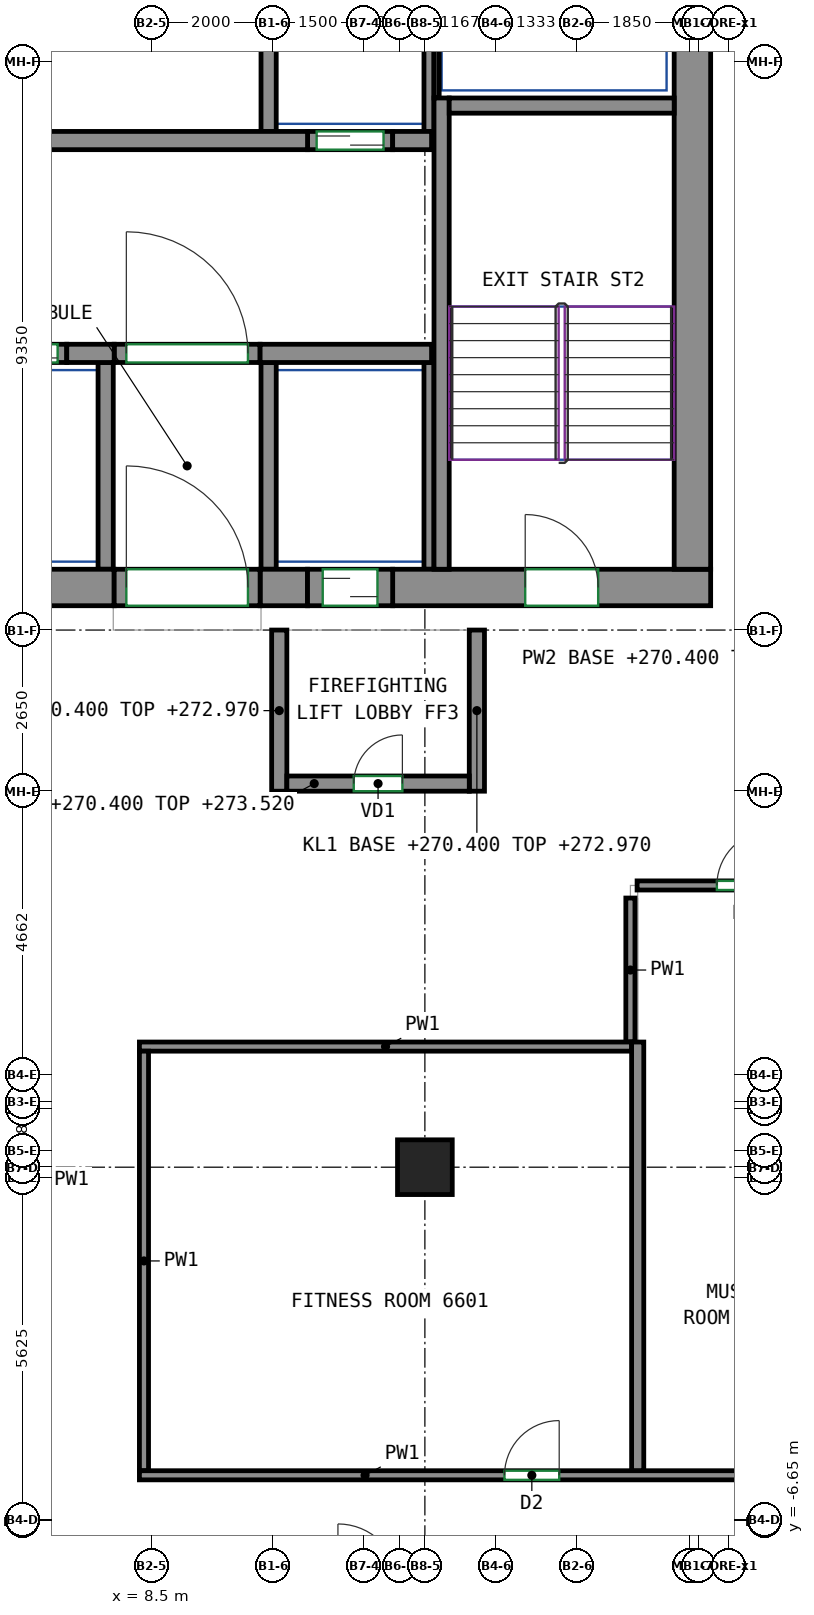
"""IFC4 building model, lengths in metres.
Left out: names, types, materials, properties, quantities, classifications, styles, units other than length and angle.
Written with IfcOpenShell. Run it as: python <this file> out.ifc"""

import sys

from ifc_helpers import new_model, si_unit, direction, frame, frame_2d, origin, origin_2d, place, context, subcontext, project, spatial, rectangle, extrude, source, transform, mapped, element, fill, save


model = new_model("IFC4")
c1 = context("Model", 3, precision=1e-05, world=origin(), true_north=direction((0.0, 1.0)))
c2 = subcontext(c1, "Body", "Model", "MODEL_VIEW")
j1 = project(units=[si_unit("LENGTHUNIT", "METRE"), si_unit("PLANEANGLEUNIT", "RADIAN")], contexts=[c1])
p1 = place(None, origin())
s1 = spatial("IfcSite", under=j1, at=p1, CompositionType="ELEMENT")
p2 = place(p1, origin())
s2 = spatial("IfcBuilding", under=s1, at=p2, CompositionType="ELEMENT")
p3 = place(p2, frame((0.0, 0.0, 270.4)))
s3 = spatial("IfcBuildingStorey", under=s2, at=p3, CompositionType="ELEMENT", Elevation=270.4)
m1 = source(origin(), c2, "Body", "SweptSolid", [
    extrude(rectangle(XDim=0.9, YDim=0.9, at=origin_2d()), origin(), (0.0, 0.0, 1.0), 3.12),
])
p4 = place(p3, frame((13.0, -0.833, 0.0), z_axis=(0.0, 0.0, 1.0), x_axis=(1.0, 0.0, 0.0)))
e1 = element("IfcColumn", 1, at=p4, inside=s3, PredefinedType="COLUMN", context=c2, shape_type="MappedRepresentation", body=[
    mapped(m1, transform((0.0, 0.0, 0.0))),
])
m2 = source(origin(), c2, "Body", "SweptSolid", [
    extrude(rectangle(XDim=14.18, YDim=0.6, at=frame_2d((7.09, 0.0))), origin(), (0.0, 0.0, 1.0), 3.12),
])
p5 = place(p3, frame((-6.29, 8.7, 0.0), z_axis=(0.0, 0.0, 1.0), x_axis=(1.0, 0.0, 0.0)))
e2 = element("IfcWall", 2, at=p5, inside=s3, PredefinedType="SHEAR", context=c2, shape_type="MappedRepresentation", body=[
    mapped(m2, transform((0.0, 0.0, 0.0))),
])
m3 = source(origin(), c2, "Body", "SweptSolid", [
    extrude(rectangle(XDim=0.78, YDim=0.6, at=frame_2d((0.39, 0.0))), origin(), (0.0, 0.0, 1.0), 3.12),
])
p6 = place(p3, frame((10.29, 8.7, 0.0), z_axis=(0.0, 0.0, 1.0), x_axis=(1.0, 0.0, 0.0)))
e3 = element("IfcWall", 3, at=p6, inside=s3, PredefinedType="SHEAR", context=c2, shape_type="MappedRepresentation", body=[
    mapped(m3, transform((0.0, 0.0, 0.0))),
])
m4 = source(origin(), c2, "Body", "SweptSolid", [
    extrude(rectangle(XDim=5.23, YDim=0.6, at=frame_2d((2.615, 0.0))), origin(), (0.0, 0.0, 1.0), 3.12),
])
p7 = place(p3, frame((12.47, 8.7, 0.0), z_axis=(0.0, 0.0, 1.0), x_axis=(1.0, 0.0, 0.0)))
e4 = element("IfcWall", 4, at=p7, inside=s3, PredefinedType="SHEAR", context=c2, shape_type="MappedRepresentation", body=[
    mapped(m4, transform((0.0, 0.0, 0.0))),
])
p8 = place(p7, frame((2.18, 0.0, 0.0)))
e5 = element("IfcOpeningElement", 5, at=p8, cuts=e4, PredefinedType="OPENING", context=c2, shape_type="SweptSolid", body=[
    extrude(rectangle(XDim=1.2, YDim=2.1, at=frame_2d((0.6, 1.05))), frame((0.0, 0.31, 0.0), z_axis=(0.0, -1.0, 0.0), x_axis=(1.0, 0.0, 0.0)), (0.0, 0.0, 1.0), 0.62),
])
m5 = source(origin(), c2, "Body", "SweptSolid", [
    extrude(rectangle(XDim=12.0, YDim=0.6, at=frame_2d((6.0, 0.0))), origin(), (0.0, 0.0, 1.0), 3.12),
])
p9 = place(p3, frame((17.4, 9.0, 0.0), z_axis=(0.0, 0.0, 1.0), x_axis=(0.0, 1.0, 0.0)))
e6 = element("IfcWall", 6, at=p9, inside=s3, PredefinedType="SHEAR", context=c2, shape_type="MappedRepresentation", body=[
    mapped(m5, transform((0.0, 0.0, 0.0))),
])
m6 = source(origin(), c2, "Body", "SweptSolid", [
    extrude(rectangle(XDim=7.75, YDim=0.25, at=frame_2d((3.875, 0.0))), origin(), (0.0, 0.0, 1.0), 3.12),
])
p10 = place(p3, frame((13.275, 9.0, 0.0), z_axis=(0.0, 0.0, 1.0), x_axis=(0.0, 1.0, 0.0)))
e7 = element("IfcWall", 7, at=p10, inside=s3, PredefinedType="SHEAR", context=c2, shape_type="MappedRepresentation", body=[
    mapped(m6, transform((0.0, 0.0, 0.0))),
])
m7 = source(origin(), c2, "Body", "SweptSolid", [
    extrude(rectangle(XDim=3.7, YDim=0.25, at=frame_2d((1.85, 0.0))), origin(), (0.0, 0.0, 1.0), 3.12),
])
p11 = place(p3, frame((13.4, 16.625, 0.0), z_axis=(0.0, 0.0, 1.0), x_axis=(1.0, 0.0, 0.0)))
e8 = element("IfcWall", 8, at=p11, inside=s3, PredefinedType="SHEAR", context=c2, shape_type="MappedRepresentation", body=[
    mapped(m7, transform((0.0, 0.0, 0.0))),
])
m8 = source(origin(), c2, "Body", "SweptSolid", [
    extrude(rectangle(XDim=0.78, YDim=0.3, at=frame_2d((0.39, 0.0))), origin(), (0.0, 0.0, 1.0), 3.12),
])
p12 = place(p3, frame((7.11, 12.55, 0.0), z_axis=(0.0, 0.0, 1.0), x_axis=(1.0, 0.0, 0.0)))
e9 = element("IfcWall", 9, at=p12, inside=s3, PredefinedType="SHEAR", context=c2, shape_type="MappedRepresentation", body=[
    mapped(m8, transform((0.0, 0.0, 0.0))),
])
m9 = source(origin(), c2, "Body", "SweptSolid", [
    extrude(rectangle(XDim=2.82, YDim=0.3, at=frame_2d((1.41, 0.0))), origin(), (0.0, 0.0, 1.0), 3.12),
])
p13 = place(p3, frame((10.29, 12.55, 0.0), z_axis=(0.0, 0.0, 1.0), x_axis=(1.0, 0.0, 0.0)))
e10 = element("IfcWall", 10, at=p13, inside=s3, PredefinedType="SHEAR", context=c2, shape_type="MappedRepresentation", body=[
    mapped(m9, transform((0.0, 0.0, 0.0))),
])
m10 = source(origin(), c2, "Body", "SweptSolid", [
    extrude(rectangle(XDim=22.08, YDim=0.3, at=frame_2d((11.04, 0.0))), origin(), (0.0, 0.0, 1.0), 3.12),
])
p14 = place(p3, frame((-11.01, 16.05, 0.0), z_axis=(0.0, 0.0, 1.0), x_axis=(1.0, 0.0, 0.0)))
e11 = element("IfcWall", 11, at=p14, inside=s3, PredefinedType="SHEAR", context=c2, shape_type="MappedRepresentation", body=[
    mapped(m10, transform((0.0, 0.0, 0.0))),
])
m11 = source(origin(), c2, "Body", "SweptSolid", [
    extrude(rectangle(XDim=0.64, YDim=0.3, at=frame_2d((0.32, 0.0))), origin(), (0.0, 0.0, 1.0), 3.12),
])
p15 = place(p3, frame((12.47, 16.05, 0.0), z_axis=(0.0, 0.0, 1.0), x_axis=(1.0, 0.0, 0.0)))
e12 = element("IfcWall", 12, at=p15, inside=s3, PredefinedType="SHEAR", context=c2, shape_type="MappedRepresentation", body=[
    mapped(m11, transform((0.0, 0.0, 0.0))),
])
m12 = source(origin(), c2, "Body", "SweptSolid", [
    extrude(rectangle(XDim=1.4, YDim=0.3, at=frame_2d((0.7, 0.0))), origin(), (0.0, 0.0, 1.0), 3.12),
])
p16 = place(p3, frame((5.71, 12.55, 0.0), z_axis=(0.0, 0.0, 1.0), x_axis=(1.0, 0.0, 0.0)))
e13 = element("IfcWall", 13, at=p16, inside=s3, PredefinedType="PARTITIONING", context=c2, shape_type="MappedRepresentation", body=[
    mapped(m12, transform((0.0, 0.0, 0.0))),
])
p17 = place(p16, frame((0.15, 0.0, 0.0)))
e14 = element("IfcOpeningElement", 14, at=p17, cuts=e13, PredefinedType="OPENING", context=c2, shape_type="SweptSolid", body=[
    extrude(rectangle(XDim=1.1, YDim=2.1, at=frame_2d((0.55, 1.05))), frame((0.0, 0.16, 0.0), z_axis=(0.0, -1.0, 0.0), x_axis=(1.0, 0.0, 0.0)), (0.0, 0.0, 1.0), 0.32),
])
m13 = source(origin(), c2, "Body", "SweptSolid", [
    extrude(rectangle(XDim=1.4, YDim=0.3, at=frame_2d((0.7, 0.0))), origin(), (0.0, 0.0, 1.0), 3.12),
])
p18 = place(p3, frame((11.07, 16.05, 0.0), z_axis=(0.0, 0.0, 1.0), x_axis=(1.0, 0.0, 0.0)))
e15 = element("IfcWall", 15, at=p18, inside=s3, PredefinedType="PARTITIONING", context=c2, shape_type="MappedRepresentation", body=[
    mapped(m13, transform((0.0, 0.0, 0.0))),
])
p19 = place(p18, frame((0.15, 0.0, 0.0)))
e16 = element("IfcOpeningElement", 16, at=p19, cuts=e15, PredefinedType="OPENING", context=c2, shape_type="SweptSolid", body=[
    extrude(rectangle(XDim=1.1, YDim=2.1, at=frame_2d((0.55, 1.05))), frame((0.0, 0.16, 0.0), z_axis=(0.0, -1.0, 0.0), x_axis=(1.0, 0.0, 0.0)), (0.0, 0.0, 1.0), 0.32),
])
m14 = source(origin(), c2, "Body", "SweptSolid", [
    extrude(rectangle(XDim=2.4, YDim=0.3, at=frame_2d((1.2, 0.0))), origin(), (0.0, 0.0, 1.0), 3.12),
])
p20 = place(p3, frame((7.89, 12.55, 0.0), z_axis=(0.0, 0.0, 1.0), x_axis=(1.0, 0.0, 0.0)))
e17 = element("IfcWall", 17, at=p20, inside=s3, PredefinedType="PARTITIONING", context=c2, shape_type="MappedRepresentation", body=[
    mapped(m14, transform((0.0, 0.0, 0.0))),
])
p21 = place(p20, frame((0.2, 0.0, 0.0)))
e18 = element("IfcOpeningElement", 18, at=p21, cuts=e17, PredefinedType="OPENING", context=c2, shape_type="SweptSolid", body=[
    extrude(rectangle(XDim=2.0, YDim=2.1, at=frame_2d((1.0, 1.05))), frame((0.0, 0.16, 0.0), z_axis=(0.0, -1.0, 0.0), x_axis=(1.0, 0.0, 0.0)), (0.0, 0.0, 1.0), 0.32),
])
m15 = source(origin(), c2, "Body", "SweptSolid", [
    extrude(rectangle(XDim=2.65, YDim=0.25, at=frame_2d((1.325, 0.0))), origin(), (0.0, 0.0, 1.0), 2.57),
])
for number, where, z_axis, x_axis in (
    (19, (10.605, 5.35, 0.0), (0.0, 0.0, 1.0), (0.0, 1.0, 0.0)),
    (20, (13.855, 5.35, 0.0), (0.0, 0.0, 1.0), (0.0, 1.0, 0.0)),
):
    element("IfcWall", number, at=place(p3, frame(where, z_axis=z_axis, x_axis=x_axis)), inside=s3, PredefinedType="PARTITIONING", context=c2, shape_type="MappedRepresentation", body=[
        mapped(m15, transform((0.0, 0.0, 0.0))),
    ])
m16 = source(origin(), c2, "Body", "SweptSolid", [
    extrude(rectangle(XDim=3.0, YDim=0.25, at=frame_2d((1.5, 0.0))), origin(), (0.0, 0.0, 1.0), 3.12),
])
p22 = place(p3, frame((10.73, 5.475, 0.0), z_axis=(0.0, 0.0, 1.0), x_axis=(1.0, 0.0, 0.0)))
e21 = element("IfcWall", 21, at=p22, inside=s3, PredefinedType="PARTITIONING", context=c2, shape_type="MappedRepresentation", body=[
    mapped(m16, transform((0.0, 0.0, 0.0))),
])
p23 = place(p22, frame((1.1, 0.0, 0.0)))
e22 = element("IfcOpeningElement", 22, at=p23, cuts=e21, PredefinedType="OPENING", context=c2, shape_type="SweptSolid", body=[
    extrude(rectangle(XDim=0.8, YDim=2.0, at=frame_2d((0.4, 1.0))), frame((0.0, 0.135, 0.0), z_axis=(0.0, -1.0, 0.0), x_axis=(1.0, 0.0, 0.0)), (0.0, 0.0, 1.0), 0.27),
])
m17 = source(origin(), c2, "Body", "SweptSolid", [
    extrude(rectangle(XDim=3.275, YDim=0.165, at=frame_2d((1.638, 0.0))), origin(), (0.0, 0.0, 1.0), 3.12),
])
p24 = place(p3, frame((13.067, 16.2, 0.0), z_axis=(0.0, 0.0, 1.0), x_axis=(0.0, 1.0, 0.0)))
e23 = element("IfcWall", 23, at=p24, inside=s3, PredefinedType="PARTITIONING", context=c2, shape_type="MappedRepresentation", body=[
    mapped(m17, transform((0.0, 0.0, 0.0))),
])
m18 = source(origin(), c2, "Body", "SweptSolid", [
    extrude(rectangle(XDim=3.275, YDim=0.25, at=frame_2d((1.638, 0.0))), origin(), (0.0, 0.0, 1.0), 3.12),
])
p25 = place(p3, frame((10.43, 16.2, 0.0), z_axis=(0.0, 0.0, 1.0), x_axis=(0.0, 1.0, 0.0)))
e24 = element("IfcWall", 24, at=p25, inside=s3, PredefinedType="PARTITIONING", context=c2, shape_type="MappedRepresentation", body=[
    mapped(m18, transform((0.0, 0.0, 0.0))),
])
m19 = source(origin(), c2, "Body", "SweptSolid", [
    extrude(rectangle(XDim=2.725, YDim=0.085, at=frame_2d((1.363, 0.0))), origin(), (0.0, 0.0, 1.0), 3.12),
])
p26 = place(p3, frame((13.192, 16.75, 0.0), z_axis=(0.0, 0.0, 1.0), x_axis=(0.0, 1.0, 0.0)))
e25 = element("IfcWall", 25, at=p26, inside=s3, PredefinedType="PARTITIONING", context=c2, shape_type="MappedRepresentation", body=[
    mapped(m19, transform((0.0, 0.0, 0.0))),
])
m20 = source(origin(), c2, "Body", "SweptSolid", [
    extrude(rectangle(XDim=3.4, YDim=0.25, at=frame_2d((1.7, 0.0))), origin(), (0.0, 0.0, 1.0), 3.12),
])
p27 = place(p3, frame((10.43, 9.0, 0.0), z_axis=(0.0, 0.0, 1.0), x_axis=(0.0, 1.0, 0.0)))
e26 = element("IfcWall", 26, at=p27, inside=s3, PredefinedType="PARTITIONING", context=c2, shape_type="MappedRepresentation", body=[
    mapped(m20, transform((0.0, 0.0, 0.0))),
])
m21 = source(origin(), c2, "Body", "SweptSolid", [
    extrude(rectangle(XDim=3.4, YDim=0.165, at=frame_2d((1.7, 0.0))), origin(), (0.0, 0.0, 1.0), 3.12),
])
p28 = place(p3, frame((13.067, 9.0, 0.0), z_axis=(0.0, 0.0, 1.0), x_axis=(0.0, 1.0, 0.0)))
e27 = element("IfcWall", 27, at=p28, inside=s3, PredefinedType="PARTITIONING", context=c2, shape_type="MappedRepresentation", body=[
    mapped(m21, transform((0.0, 0.0, 0.0))),
])
p29 = place(p3, frame((7.75, 9.0, 0.0), z_axis=(0.0, 0.0, 1.0), x_axis=(0.0, 1.0, 0.0)))
e28 = element("IfcWall", 28, at=p29, inside=s3, PredefinedType="PARTITIONING", context=c2, shape_type="MappedRepresentation", body=[
    mapped(m20, transform((0.0, 0.0, 0.0))),
])
m22 = source(origin(), c2, "Body", "SweptSolid", [
    extrude(rectangle(XDim=2.4, YDim=0.6, at=frame_2d((1.2, 0.0))), origin(), (0.0, 0.0, 1.0), 2.7),
])
p30 = place(p3, frame((7.89, 8.7, 0.0), z_axis=(0.0, 0.0, 1.0), x_axis=(1.0, 0.0, 0.0)))
e29 = element("IfcWall", 29, at=p30, inside=s3, PredefinedType="PARTITIONING", context=c2, shape_type="MappedRepresentation", body=[
    mapped(m22, transform((0.0, 0.0, 0.0))),
])
p31 = place(p30, frame((0.2, 0.0, 0.0)))
e30 = element("IfcOpeningElement", 30, at=p31, cuts=e29, PredefinedType="OPENING", context=c2, shape_type="SweptSolid", body=[
    extrude(rectangle(XDim=2.0, YDim=2.1, at=frame_2d((1.0, 1.05))), frame((0.0, 0.31, 0.0), z_axis=(0.0, -1.0, 0.0), x_axis=(1.0, 0.0, 0.0)), (0.0, 0.0, 1.0), 0.62),
])
m23 = source(origin(), c2, "Body", "SweptSolid", [
    extrude(rectangle(XDim=1.4, YDim=0.6, at=frame_2d((0.7, 0.0))), origin(), (0.0, 0.0, 1.0), 2.7),
])
p32 = place(p3, frame((11.07, 8.7, 0.0), z_axis=(0.0, 0.0, 1.0), x_axis=(1.0, 0.0, 0.0)))
e31 = element("IfcWall", 31, at=p32, inside=s3, PredefinedType="PARTITIONING", context=c2, shape_type="MappedRepresentation", body=[
    mapped(m23, transform((0.0, 0.0, 0.0))),
])
p33 = place(p32, frame((0.25, 0.0, 0.0)))
e32 = element("IfcOpeningElement", 32, at=p33, cuts=e31, PredefinedType="OPENING", context=c2, shape_type="SweptSolid", body=[
    extrude(rectangle(XDim=0.9, YDim=2.1, at=frame_2d((0.45, 1.05))), frame((0.0, 0.31, 0.0), z_axis=(0.0, -1.0, 0.0), x_axis=(1.0, 0.0, 0.0)), (0.0, 0.0, 1.0), 0.62),
])
p34 = place(p3, frame((16.38, 1.225, 0.0), z_axis=(0.0, 0.0, 1.0), x_axis=(0.0, 1.0, 0.0)))
e33 = element("IfcWall", 33, at=p34, inside=s3, PredefinedType="PARTITIONING", context=c2, shape_type="SweptSolid", body=[
    extrude(rectangle(XDim=2.368, YDim=0.15, at=frame_2d((1.184, 0.0))), origin(), (0.0, 0.0, 1.0), 3.12),
])
p35 = place(p3, frame((8.305, 1.15, 0.0), z_axis=(0.0, 0.0, 1.0), x_axis=(1.0, 0.0, 0.0)))
e34 = element("IfcWall", 34, at=p35, inside=s3, PredefinedType="PARTITIONING", context=c2, shape_type="SweptSolid", body=[
    extrude(rectangle(XDim=8.095, YDim=0.15, at=frame_2d((4.047, 0.0))), origin(), (0.0, 0.0, 1.0), 3.12),
])
p36 = place(p3, frame((8.38, -5.825, 0.0), z_axis=(0.0, 0.0, 1.0), x_axis=(0.0, 1.0, 0.0)))
e35 = element("IfcWall", 35, at=p36, inside=s3, PredefinedType="PARTITIONING", context=c2, shape_type="SweptSolid", body=[
    extrude(rectangle(XDim=6.9, YDim=0.15, at=frame_2d((3.45, 0.0))), origin(), (0.0, 0.0, 1.0), 3.12),
])
p37 = place(p3, frame((8.305, -5.9, 0.0), z_axis=(0.0, 0.0, 1.0), x_axis=(1.0, 0.0, 0.0)))
e36 = element("IfcWall", 36, at=p37, inside=s3, PredefinedType="PARTITIONING", context=c2, shape_type="SweptSolid", body=[
    extrude(rectangle(XDim=12.37, YDim=0.15, at=frame_2d((6.185, 0.0))), origin(), (0.0, 0.0, 1.0), 3.12),
])
p38 = place(p37, frame((6.004, 0.0, 0.0)))
e37 = element("IfcOpeningElement", 37, at=p38, cuts=e36, PredefinedType="OPENING", context=c2, shape_type="SweptSolid", body=[
    extrude(rectangle(XDim=0.9, YDim=2.1, at=frame_2d((0.45, 1.05))), frame((0.0, 0.085, 0.0), z_axis=(0.0, -1.0, 0.0), x_axis=(1.0, 0.0, 0.0)), (0.0, 0.0, 1.0), 0.17),
])
p39 = place(p3, frame((16.49, 3.8, 0.0), z_axis=(0.0, 0.0, 1.0), x_axis=(1.0, 0.0, 0.0)))
e38 = element("IfcWall", 38, at=p39, inside=s3, PredefinedType="PARTITIONING", context=c2, shape_type="SweptSolid", body=[
    extrude(rectangle(XDim=4.085, YDim=0.15, at=frame_2d((2.042, 0.0))), origin(), (0.0, 0.0, 1.0), 3.12),
])
p40 = place(p39, frame((1.312, 0.0, 0.0)))
e39 = element("IfcOpeningElement", 39, at=p40, cuts=e38, PredefinedType="OPENING", context=c2, shape_type="SweptSolid", body=[
    extrude(rectangle(XDim=0.9, YDim=2.1, at=frame_2d((0.45, 1.05))), frame((0.0, 0.085, 0.0), z_axis=(0.0, -1.0, 0.0), x_axis=(1.0, 0.0, 0.0)), (0.0, 0.0, 1.0), 0.17),
])
p41 = place(p3, frame((16.5, -5.823, 0.0), z_axis=(0.0, 0.0, 1.0), x_axis=(0.0, 1.0, 0.0)))
e40 = element("IfcWall", 40, at=p41, inside=s3, PredefinedType="PARTITIONING", context=c2, shape_type="SweptSolid", body=[
    extrude(rectangle(XDim=7.048, YDim=0.2, at=frame_2d((3.524, 0.0))), origin(), (0.0, 0.0, 1.0), 3.12),
])
p42 = place(p21, origin())
e41 = element("IfcDoor", 41, at=p42, inside=s3, OperationType="DOUBLE_DOOR_SINGLE_SWING", PredefinedType="DOOR", context=c2, shape_type="SweptSolid", body=[
    extrude(rectangle(XDim=2.0, YDim=2.1, at=frame_2d((1.0, 1.05))), frame((0.0, 0.025, 0.0), z_axis=(0.0, -1.0, 0.0), x_axis=(1.0, 0.0, 0.0)), (0.0, 0.0, 1.0), 0.05),
])
fill(e18, e41)
p43 = place(p31, origin())
e42 = element("IfcDoor", 42, at=p43, inside=s3, OperationType="DOUBLE_DOOR_SINGLE_SWING", PredefinedType="DOOR", context=c2, shape_type="SweptSolid", body=[
    extrude(rectangle(XDim=2.0, YDim=2.1, at=frame_2d((1.0, 1.05))), frame((0.0, 0.205, 0.0), z_axis=(0.0, -1.0, 0.0), x_axis=(1.0, 0.0, 0.0)), (0.0, 0.0, 1.0), 0.05),
])
fill(e30, e42)
p44 = place(p23, origin())
e43 = element("IfcDoor", 43, at=p44, inside=s3, OperationType="SINGLE_SWING_RIGHT", PredefinedType="DOOR", context=c2, shape_type="SweptSolid", body=[
    extrude(rectangle(XDim=0.8, YDim=2.0, at=frame_2d((0.4, 1.0))), frame((0.0, 0.025, 0.0), z_axis=(0.0, -1.0, 0.0), x_axis=(1.0, 0.0, 0.0)), (0.0, 0.0, 1.0), 0.05),
])
fill(e22, e43)
p45 = place(p33, origin())
e44 = element("IfcDoor", 44, at=p45, inside=s3, OperationType="SLIDING_TO_LEFT", PredefinedType="DOOR", context=c2, shape_type="SweptSolid", body=[
    extrude(rectangle(XDim=0.9, YDim=2.1, at=frame_2d((0.45, 1.05))), frame((0.0, 0.205, 0.0), z_axis=(0.0, -1.0, 0.0), x_axis=(1.0, 0.0, 0.0)), (0.0, 0.0, 1.0), 0.05),
])
fill(e32, e44)
p46 = place(p17, origin())
e45 = element("IfcDoor", 45, at=p46, inside=s3, OperationType="DOUBLE_DOOR_SLIDING", PredefinedType="DOOR", context=c2, shape_type="SweptSolid", body=[
    extrude(rectangle(XDim=1.1, YDim=2.1, at=frame_2d((0.55, 1.05))), frame((0.0, 0.025, 0.0), z_axis=(0.0, -1.0, 0.0), x_axis=(1.0, 0.0, 0.0)), (0.0, 0.0, 1.0), 0.05),
])
fill(e14, e45)
p47 = place(p19, origin())
e46 = element("IfcDoor", 46, at=p47, inside=s3, OperationType="DOUBLE_DOOR_SLIDING", PredefinedType="DOOR", context=c2, shape_type="SweptSolid", body=[
    extrude(rectangle(XDim=1.1, YDim=2.1, at=frame_2d((0.55, 1.05))), frame((0.0, 0.025, 0.0), z_axis=(0.0, -1.0, 0.0), x_axis=(1.0, 0.0, 0.0)), (0.0, 0.0, 1.0), 0.05),
])
fill(e16, e46)
p48 = place(p8, origin())
e47 = element("IfcDoor", 47, at=p48, inside=s3, OperationType="DOUBLE_DOOR_SINGLE_SWING", PredefinedType="DOOR", context=c2, shape_type="SweptSolid", body=[
    extrude(rectangle(XDim=1.2, YDim=2.1, at=frame_2d((0.6, 1.05))), frame((0.0, 0.205, 0.0), z_axis=(0.0, -1.0, 0.0), x_axis=(1.0, 0.0, 0.0)), (0.0, 0.0, 1.0), 0.05),
])
fill(e5, e47)
p49 = place(p38, origin())
e48 = element("IfcDoor", 48, at=p49, inside=s3, OperationType="SINGLE_SWING_RIGHT", PredefinedType="DOOR", context=c2, shape_type="SweptSolid", body=[
    extrude(rectangle(XDim=0.9, YDim=2.1, at=frame_2d((0.45, 1.05))), frame((0.0, 0.025, 0.0), z_axis=(0.0, -1.0, 0.0), x_axis=(1.0, 0.0, 0.0)), (0.0, 0.0, 1.0), 0.05),
])
fill(e37, e48)
p50 = place(p40, origin())
e49 = element("IfcDoor", 49, at=p50, inside=s3, OperationType="SINGLE_SWING_RIGHT", PredefinedType="DOOR", context=c2, shape_type="SweptSolid", body=[
    extrude(rectangle(XDim=0.9, YDim=2.1, at=frame_2d((0.45, 1.05))), frame((0.0, 0.025, 0.0), z_axis=(0.0, -1.0, 0.0), x_axis=(1.0, 0.0, 0.0)), (0.0, 0.0, 1.0), 0.05),
])
fill(e39, e49)
save(model, sys.argv[1])
